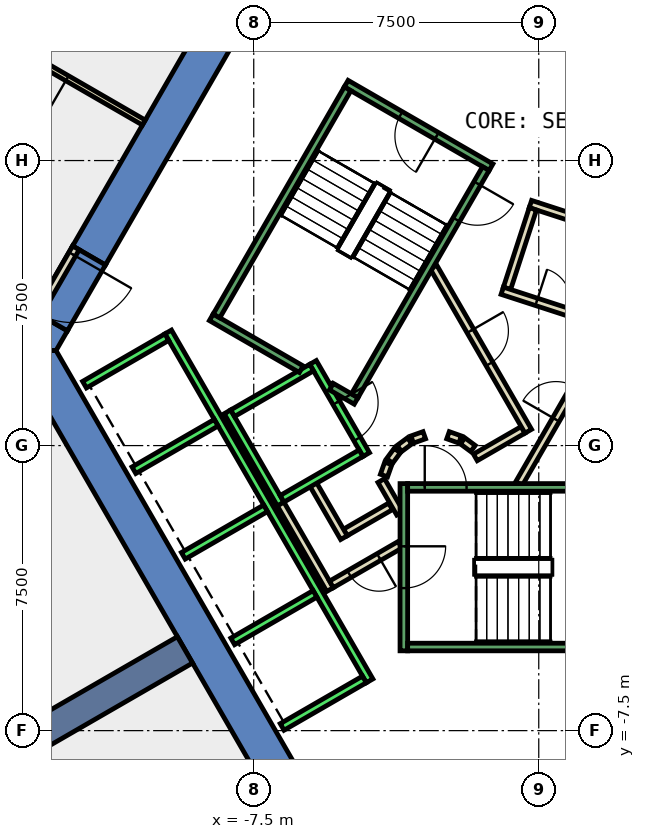
"""IFC4 building model, lengths in metres.
Left out: names, types, materials, properties, quantities, classifications, styles, units other than length and angle.
Written with IfcOpenShell. Run it as: python <this file> out.ifc"""

import sys

from ifc_helpers import new_model, si_unit, direction, frame, frame_2d, origin, place, context, subcontext, project, spatial, polyline, rectangle, outline, extrude, element, fill, save


model = new_model("IFC4")
c1 = context("Model", 3, precision=1e-05, world=origin(), true_north=direction((0.0, 1.0)))
c2 = subcontext(c1, "Body", "Model", "MODEL_VIEW")
j1 = project(units=[si_unit("LENGTHUNIT", "METRE"), si_unit("PLANEANGLEUNIT", "RADIAN")], contexts=[c1])
p1 = place(None, origin())
s1 = spatial("IfcSite", under=j1, at=p1, CompositionType="ELEMENT")
p2 = place(p1, origin())
s2 = spatial("IfcBuilding", under=s1, at=p2, CompositionType="ELEMENT")
p3 = place(p2, frame((0.0, 0.0, 15.0)))
s3 = spatial("IfcBuildingStorey", under=s2, at=p3, CompositionType="ELEMENT", Elevation=15.0)
p4 = place(p3, frame((0.0, 0.0, -0.45)))
e1 = element("IfcWall", 1, at=p4, inside=s3, PredefinedType="SHEAR", context=c2, shape_type="SweptSolid", body=[
    extrude(outline(polyline([(-12.267, 5.252), (-11.402, 4.752), (-6.351, 13.5), (-6.928, 14.5), (-12.267, 5.252)])), origin(), (0.0, 0.0, 1.0), 5.0),
])
p5 = place(p3, frame((0.0, 0.0, -0.45)))
e2 = element("IfcWall", 2, at=p5, inside=s3, PredefinedType="SHEAR", context=c2, shape_type="SweptSolid", body=[
    extrude(outline(polyline([(-12.402, 3.02), (-13.267, 3.52), (-13.856, 2.5), (-12.702, 2.5), (-12.402, 3.02)])), origin(), (0.0, 0.0, 1.0), 5.0),
])
p6 = place(p3, frame((0.0, 0.0, 3.6)))
e3 = element("IfcWall", 3, at=p6, inside=s3, PredefinedType="SHEAR", context=c2, shape_type="SweptSolid", body=[
    extrude(outline(polyline([(-13.267, 3.52), (-12.402, 3.02), (-11.402, 4.752), (-12.267, 5.252), (-13.267, 3.52)])), origin(), (0.0, 0.0, 1.0), 0.95),
])
p7 = place(p3, frame((0.0, 0.0, -0.45)))
e4 = element("IfcWall", 4, at=p7, inside=s3, PredefinedType="SHEAR", context=c2, shape_type="SweptSolid", body=[
    extrude(outline(polyline([(-13.856, 2.5), (-6.928, -9.5), (-6.351, -8.5), (-12.702, 2.5), (-13.856, 2.5)])), origin(), (0.0, 0.0, 1.0), 5.0),
])
p8 = place(p3, frame((-9.31, -5.375, -0.45), z_axis=(0.0, 0.0, 1.0), x_axis=(-0.866017533419, -0.500013631625, 0.0)))
e5 = element("IfcWall", 5, at=p8, inside=s3, PredefinedType="SHEAR", context=c2, shape_type="SweptSolid", body=[
    extrude(rectangle(XDim=9.0, YDim=0.8, at=frame_2d((4.5, 0.0))), origin(), (0.0, 0.0, 1.0), 5.0),
])
p9 = place(p3, frame((-3.9, -1.599, 0.0), z_axis=(0.0, 0.0, 1.0), x_axis=(-0.865969445389, -0.500096910261, 0.0)))
e6 = element("IfcWall", 6, at=p9, inside=s3, PredefinedType="PARTITIONING", context=c2, shape_type="SweptSolid", body=[
    extrude(rectangle(XDim=1.373, YDim=0.2, at=frame_2d((0.687, 0.0))), origin(), (0.0, 0.0, 1.0), 4.55),
])
p10 = place(p3, frame((-5.126, -2.422, 0.0), z_axis=(0.0, 0.0, 1.0), x_axis=(-0.500062241894, 0.865989465428, 0.0)))
e7 = element("IfcWall", 7, at=p10, inside=s3, PredefinedType="PARTITIONING", context=c2, shape_type="SweptSolid", body=[
    extrude(rectangle(XDim=1.7, YDim=0.2, at=frame_2d((0.85, 0.0))), origin(), (0.0, 0.0, 1.0), 4.55),
])
p11 = place(p3, frame((-5.492, -3.788, 0.0), z_axis=(0.0, 0.0, 1.0), x_axis=(-0.500008949224, 0.866020236886, 0.0)))
e8 = element("IfcWall", 8, at=p11, inside=s3, PredefinedType="PARTITIONING", context=c2, shape_type="SweptSolid", body=[
    extrude(rectangle(XDim=2.68, YDim=0.2, at=frame_2d((1.34, 0.0))), origin(), (0.0, 0.0, 1.0), 4.55),
])
p12 = place(p3, frame((-4.145, -0.92, 0.0), z_axis=(0.0, 0.0, 1.0), x_axis=(0.499743786207, -0.866173278362, 0.0)))
e9 = element("IfcWall", 9, at=p12, inside=s3, PredefinedType="PARTITIONING", context=c2, shape_type="SweptSolid", body=[
    extrude(rectangle(XDim=0.991, YDim=0.2, at=frame_2d((0.495, 0.0))), origin(), (0.0, 0.0, 1.0), 4.55),
])
p13 = place(p3, frame((-3.65, -2.61, 0.0), z_axis=(0.0, 0.0, 1.0), x_axis=(-0.866072462134, -0.499918483688, 0.0)))
e10 = element("IfcWall", 10, at=p13, inside=s3, PredefinedType="PARTITIONING", context=c2, shape_type="SweptSolid", body=[
    extrude(rectangle(XDim=2.084, YDim=0.2, at=frame_2d((1.042, 0.0))), origin(), (0.0, 0.0, 1.0), 4.55),
])
p14 = place(p13, frame((0.642, 0.0, 0.0)))
e11 = element("IfcOpeningElement", 11, at=p14, cuts=e10, PredefinedType="OPENING", context=c2, shape_type="SweptSolid", body=[
    extrude(rectangle(XDim=0.9, YDim=2.1, at=frame_2d((0.45, 1.05))), frame((0.0, 0.11, 0.0), z_axis=(0.0, -1.0, 0.0), x_axis=(1.0, 0.0, 0.0)), (0.0, 0.0, 1.0), 0.22),
])
p15 = place(p3, frame((2.285, 5.543, 0.0), z_axis=(0.0, 0.0, 1.0), x_axis=(-0.951121264368, 0.308817649215, 0.0)))
e12 = element("IfcWall", 12, at=p15, inside=s3, PredefinedType="PARTITIONING", context=c2, shape_type="SweptSolid", body=[
    extrude(rectangle(XDim=2.633, YDim=0.2, at=frame_2d((1.316, 0.0))), origin(), (0.0, 0.0, 1.0), 4.55),
])
p16 = place(p3, frame((-0.155, 6.23, 0.0), z_axis=(0.0, 0.0, 1.0), x_axis=(-0.309093600997, -0.951031621884, 0.0)))
e13 = element("IfcWall", 13, at=p16, inside=s3, PredefinedType="PARTITIONING", context=c2, shape_type="SweptSolid", body=[
    extrude(rectangle(XDim=2.2, YDim=0.2, at=frame_2d((1.1, 0.0))), origin(), (0.0, 0.0, 1.0), 4.55),
])
p17 = place(p3, frame((-0.961, 4.074, 0.0), z_axis=(0.0, 0.0, 1.0), x_axis=(0.951079555704, -0.308946077369, 0.0)))
e14 = element("IfcWall", 14, at=p17, inside=s3, PredefinedType="PARTITIONING", context=c2, shape_type="SweptSolid", body=[
    extrude(rectangle(XDim=2.8, YDim=0.2, at=frame_2d((1.4, 0.0))), origin(), (0.0, 0.0, 1.0), 4.55),
])
p18 = place(p17, frame((0.95, 0.0, 0.0)))
e15 = element("IfcOpeningElement", 15, at=p18, cuts=e14, PredefinedType="OPENING", context=c2, shape_type="SweptSolid", body=[
    extrude(rectangle(XDim=0.9, YDim=2.1, at=frame_2d((0.45, 1.05))), frame((0.0, 0.11, 0.0), z_axis=(0.0, -1.0, 0.0), x_axis=(1.0, 0.0, 0.0)), (0.0, 0.0, 1.0), 0.22),
])
p19 = place(p3, frame((-0.52, -1.0, 0.0), z_axis=(0.0, 0.0, 1.0), x_axis=(0.50011622646, 0.865958290007, 0.0)))
e16 = element("IfcWall", 16, at=p19, inside=s3, PredefinedType="PARTITIONING", context=c2, shape_type="SweptSolid", body=[
    extrude(rectangle(XDim=4.991, YDim=0.2, at=frame_2d((2.496, 0.0))), origin(), (0.0, 0.0, 1.0), 4.55),
])
p20 = place(p19, frame((1.945, 0.0, 0.0)))
e17 = element("IfcOpeningElement", 17, at=p20, cuts=e16, PredefinedType="OPENING", context=c2, shape_type="SweptSolid", body=[
    extrude(rectangle(XDim=1.0, YDim=2.1, at=frame_2d((0.5, 1.05))), frame((0.0, 0.11, 0.0), z_axis=(0.0, -1.0, 0.0), x_axis=(1.0, 0.0, 0.0)), (0.0, 0.0, 1.0), 0.22),
])
p21 = place(p3, frame((-0.412, 0.414, 0.0), z_axis=(0.0, 0.0, 1.0), x_axis=(-0.866017369001, -0.500013916395, 0.0)))
e18 = element("IfcWall", 18, at=p21, inside=s3, PredefinedType="PARTITIONING", context=c2, shape_type="SweptSolid", body=[
    extrude(rectangle(XDim=1.45, YDim=0.2, at=frame_2d((0.725, 0.0))), origin(), (0.0, 0.0, 1.0), 4.55),
])
p22 = place(p3, frame((-1.731, -0.077, 0.0), z_axis=(0.0, 0.0, 1.0), x_axis=(-0.804311165252, 0.594208338422, 0.0)))
e19 = element("IfcWall", 19, at=p22, inside=s3, PredefinedType="PARTITIONING", context=c2, shape_type="SweptSolid", body=[
    extrude(rectangle(XDim=0.338, YDim=0.2, at=frame_2d((0.169, 0.0))), origin(), (0.0, 0.0, 1.0), 4.55),
])
p23 = place(p3, frame((-2.07, 0.16, 0.0), z_axis=(0.0, 0.0, 1.0), x_axis=(-0.942199461132, 0.335052496547, 0.0)))
e20 = element("IfcWall", 20, at=p23, inside=s3, PredefinedType="PARTITIONING", context=c2, shape_type="SweptSolid", body=[
    extrude(rectangle(XDim=0.337, YDim=0.2, at=frame_2d((0.169, 0.0))), origin(), (0.0, 0.0, 1.0), 4.55),
])
p24 = place(p3, frame((-3.012, 0.273, 0.0), z_axis=(0.0, 0.0, 1.0), x_axis=(-0.942280615813, -0.334824194261, 0.0)))
e21 = element("IfcWall", 21, at=p24, inside=s3, PredefinedType="PARTITIONING", context=c2, shape_type="SweptSolid", body=[
    extrude(rectangle(XDim=0.338, YDim=0.2, at=frame_2d((0.169, 0.0))), origin(), (0.0, 0.0, 1.0), 4.55),
])
p25 = place(p3, frame((-3.397, 0.124, 0.0), z_axis=(0.0, 0.0, 1.0), x_axis=(-0.804311165252, -0.594208338422, 0.0)))
e22 = element("IfcWall", 22, at=p25, inside=s3, PredefinedType="PARTITIONING", context=c2, shape_type="SweptSolid", body=[
    extrude(rectangle(XDim=0.338, YDim=0.2, at=frame_2d((0.169, 0.0))), origin(), (0.0, 0.0, 1.0), 4.55),
])
p26 = place(p3, frame((-3.723, -0.131, 0.0), z_axis=(0.0, 0.0, 1.0), x_axis=(-0.594675113454, -0.803966112121, 0.0)))
e23 = element("IfcWall", 23, at=p26, inside=s3, PredefinedType="PARTITIONING", context=c2, shape_type="SweptSolid", body=[
    extrude(rectangle(XDim=0.338, YDim=0.2, at=frame_2d((0.169, 0.0))), origin(), (0.0, 0.0, 1.0), 4.55),
])
p27 = place(p3, frame((-3.96, -0.47, 0.0), z_axis=(0.0, 0.0, 1.0), x_axis=(-0.334824194261, -0.942280615813, 0.0)))
e24 = element("IfcWall", 24, at=p27, inside=s3, PredefinedType="PARTITIONING", context=c2, shape_type="SweptSolid", body=[
    extrude(rectangle(XDim=0.338, YDim=0.2, at=frame_2d((0.169, 0.0))), origin(), (0.0, 0.0, 1.0), 4.55),
])
p28 = place(p3, frame((-2.771, 4.7, 0.0), z_axis=(0.0, 0.0, 1.0), x_axis=(0.499969479948, -0.866043023828, 0.0)))
e25 = element("IfcWall", 25, at=p28, inside=s3, PredefinedType="PARTITIONING", context=c2, shape_type="SweptSolid", body=[
    extrude(rectangle(XDim=4.99, YDim=0.2, at=frame_2d((2.495, 0.0))), origin(), (0.0, 0.0, 1.0), 4.55),
])
p29 = place(p28, frame((1.945, 0.0, 0.0)))
e26 = element("IfcOpeningElement", 26, at=p29, cuts=e25, PredefinedType="OPENING", context=c2, shape_type="SweptSolid", body=[
    extrude(rectangle(XDim=1.0, YDim=2.1, at=frame_2d((0.5, 1.05))), frame((0.0, 0.11, 0.0), z_axis=(0.0, -1.0, 0.0), x_axis=(1.0, 0.0, 0.0)), (0.0, 0.0, 1.0), 0.22),
])
p30 = place(p3, frame((-10.392, 8.5, 0.0), z_axis=(0.0, 0.0, 1.0), x_axis=(-0.865967369837, 0.500100504277, 0.0)))
e27 = element("IfcWall", 27, at=p30, inside=s3, PredefinedType="PARTITIONING", context=c2, shape_type="SweptSolid", body=[
    extrude(rectangle(XDim=6.317, YDim=0.15, at=frame_2d((3.158, 0.0))), origin(), (0.0, 0.0, 1.0), 4.55),
])
p31 = place(p30, frame((2.33, 0.0, 0.0)))
e28 = element("IfcOpeningElement", 28, at=p31, cuts=e27, PredefinedType="OPENING", context=c2, shape_type="SweptSolid", body=[
    extrude(rectangle(XDim=1.8, YDim=2.1, at=frame_2d((0.9, 1.05))), frame((0.0, 0.085, 0.0), z_axis=(0.0, -1.0, 0.0), x_axis=(1.0, 0.0, 0.0)), (0.0, 0.0, 1.0), 0.17),
])
p32 = place(p3, frame((-12.18, 5.202, 0.0), z_axis=(0.0, 0.0, 1.0), x_axis=(-0.50002537861, -0.866010750942, 0.0)))
e29 = element("IfcWall", 29, at=p32, inside=s3, PredefinedType="PARTITIONING", context=c2, shape_type="SweptSolid", body=[
    extrude(rectangle(XDim=2.0, YDim=0.2, at=frame_2d((1.0, 0.0))), origin(), (0.0, 0.0, 1.0), 2.4),
])
p33 = place(p32, frame((0.19, 0.0, 0.0)))
e30 = element("IfcOpeningElement", 30, at=p33, cuts=e29, PredefinedType="OPENING", context=c2, shape_type="SweptSolid", body=[
    extrude(rectangle(XDim=1.8, YDim=2.1, at=frame_2d((0.9, 1.05))), frame((0.0, 0.11, 0.0), z_axis=(0.0, -1.0, 0.0), x_axis=(1.0, 0.0, 0.0)), (0.0, 0.0, 1.0), 0.22),
])
p34 = place(p3, frame((-5.94, 2.188, 0.0), z_axis=(0.0, 0.0, 1.0), x_axis=(0.49994636267, -0.866056369097, 0.0)))
e31 = element("IfcWall", 31, at=p34, inside=s3, PredefinedType="STANDARD", context=c2, shape_type="SweptSolid", body=[
    extrude(rectangle(XDim=2.8, YDim=0.2, at=frame_2d((1.4, 0.0))), origin(), (0.0, 0.0, 1.0), 4.55),
])
p35 = place(p34, frame((1.225, 0.0, 0.0)))
e32 = element("IfcOpeningElement", 32, at=p35, cuts=e31, PredefinedType="OPENING", context=c2, shape_type="SweptSolid", body=[
    extrude(rectangle(XDim=1.1, YDim=2.1, at=frame_2d((0.55, 1.05))), frame((0.0, 0.11, 0.0), z_axis=(0.0, -1.0, 0.0), x_axis=(1.0, 0.0, 0.0)), (0.0, 0.0, 1.0), 0.22),
])
p36 = place(p3, frame((-8.192, 0.888, 0.0), z_axis=(0.0, 0.0, 1.0), x_axis=(0.49994636267, -0.866056369097, 0.0)))
e33 = element("IfcWall", 33, at=p36, inside=s3, PredefinedType="STANDARD", context=c2, shape_type="SweptSolid", body=[
    extrude(rectangle(XDim=2.8, YDim=0.2, at=frame_2d((1.4, 0.0))), origin(), (0.0, 0.0, 1.0), 4.55),
])
for number, where, z_axis, x_axis in (
    (34, (-5.977, 2.052, 0.0), (0.0, 0.0, 1.0), (-0.866, -0.5, 0.0)),
    (35, (-4.677, -0.2, 0.0), (0.0, 0.0, 1.0), (-0.866, -0.5, 0.0)),
):
    element("IfcWall", number, at=place(p3, frame(where, z_axis=z_axis, x_axis=x_axis)), inside=s3, PredefinedType="STANDARD", context=c2, shape_type="SweptSolid", body=[
        extrude(rectangle(XDim=2.399, YDim=0.2, at=frame_2d((1.2, 0.0))), origin(), (0.0, 0.0, 1.0), 4.55),
    ])
p37 = place(p3, frame((-9.751, 2.99, 0.0), z_axis=(0.0, 0.0, 1.0), x_axis=(0.50000090737, -0.866024879913, 0.0)))
e36 = element("IfcWall", 36, at=p37, inside=s3, PredefinedType="STANDARD", context=c2, shape_type="SweptSolid", body=[
    extrude(rectangle(XDim=10.6, YDim=0.2, at=frame_2d((5.3, 0.0))), origin(), (0.0, 0.0, 1.0), 4.55),
])
p38 = place(p3, frame((-9.788, 2.853, 0.0), z_axis=(0.0, 0.0, 1.0), x_axis=(-0.865998541277, -0.500046524342, 0.0)))
e37 = element("IfcWall", 37, at=p38, inside=s3, PredefinedType="STANDARD", context=c2, shape_type="SweptSolid", body=[
    extrude(rectangle(XDim=2.5, YDim=0.2, at=frame_2d((1.25, 0.0))), origin(), (0.0, 0.0, 1.0), 4.55),
])
for number, where, z_axis, x_axis in (
    (38, (-8.488, 0.602, 0.0), (0.0, 0.0, 1.0), (-0.866, -0.5, 0.0)),
    (39, (-7.188, -1.65, 0.0), (0.0, 0.0, 1.0), (-0.866, -0.5, 0.0)),
    (40, (-5.888, -3.902, 0.0), (0.0, 0.0, 1.0), (-0.866, -0.5, 0.0)),
    (41, (-4.588, -6.153, 0.0), (0.0, 0.0, 1.0), (-0.866, -0.5, 0.0)),
):
    element("IfcWall", number, at=place(p3, frame(where, z_axis=z_axis, x_axis=x_axis)), inside=s3, PredefinedType="STANDARD", context=c2, shape_type="SweptSolid", body=[
        extrude(rectangle(XDim=2.5, YDim=0.2, at=frame_2d((1.25, 0.0))), origin(), (0.0, 0.0, 1.0), 4.55),
    ])
p39 = place(p3, frame((-3.55, -1.0, 0.0), z_axis=(0.0, 0.0, 1.0), x_axis=(0.0, -1.0, 0.0)))
e42 = element("IfcWall", 42, at=p39, inside=s3, PredefinedType="STANDARD", context=c2, shape_type="SweptSolid", body=[
    extrude(rectangle(XDim=4.4, YDim=0.2, at=frame_2d((2.2, 0.0))), origin(), (0.0, 0.0, 1.0), 4.55),
])
p40 = place(p39, frame((1.65, 0.0, 0.0)))
e43 = element("IfcOpeningElement", 43, at=p40, cuts=e42, PredefinedType="OPENING", context=c2, shape_type="SweptSolid", body=[
    extrude(rectangle(XDim=1.1, YDim=2.2, at=frame_2d((0.55, 1.1))), frame((0.0, 0.11, 0.0), z_axis=(0.0, -1.0, 0.0), x_axis=(1.0, 0.0, 0.0)), (0.0, 0.0, 1.0), 0.22),
])
p41 = place(p3, frame((-3.45, -1.1, 0.0), z_axis=(0.0, 0.0, 1.0), x_axis=(1.0, 0.0, 0.0)))
e44 = element("IfcWall", 44, at=p41, inside=s3, PredefinedType="STANDARD", context=c2, shape_type="SweptSolid", body=[
    extrude(rectangle(XDim=6.9, YDim=0.2, at=frame_2d((3.45, 0.0))), origin(), (0.0, 0.0, 1.0), 4.55),
])
p42 = place(p41, frame((0.45, 0.0, 0.0)))
e45 = element("IfcOpeningElement", 45, at=p42, cuts=e44, PredefinedType="OPENING", context=c2, shape_type="SweptSolid", body=[
    extrude(rectangle(XDim=1.1, YDim=2.2, at=frame_2d((0.55, 1.1))), frame((0.0, 0.11, 0.0), z_axis=(0.0, -1.0, 0.0), x_axis=(1.0, 0.0, 0.0)), (0.0, 0.0, 1.0), 0.22),
])
p43 = place(p3, frame((-3.45, -5.3, 0.0), z_axis=(0.0, 0.0, 1.0), x_axis=(1.0, 0.0, 0.0)))
e46 = element("IfcWall", 46, at=p43, inside=s3, PredefinedType="STANDARD", context=c2, shape_type="SweptSolid", body=[
    extrude(rectangle(XDim=6.9, YDim=0.2, at=frame_2d((3.45, 0.0))), origin(), (0.0, 0.0, 1.0), 4.55),
])
p44 = place(p3, frame((-1.256, 7.324, 0.0), z_axis=(0.0, 0.0, 1.0), x_axis=(-0.866046073146, 0.499964197906, 0.0)))
e47 = element("IfcWall", 47, at=p44, inside=s3, PredefinedType="STANDARD", context=c2, shape_type="SweptSolid", body=[
    extrude(rectangle(XDim=4.4, YDim=0.2, at=frame_2d((2.2, 0.0))), origin(), (0.0, 0.0, 1.0), 4.55),
])
p45 = place(p44, frame((1.65, 0.0, 0.0)))
e48 = element("IfcOpeningElement", 48, at=p45, cuts=e47, PredefinedType="OPENING", context=c2, shape_type="SweptSolid", body=[
    extrude(rectangle(XDim=1.1, YDim=2.2, at=frame_2d((0.55, 1.1))), frame((0.0, 0.11, 0.0), z_axis=(0.0, -1.0, 0.0), x_axis=(1.0, 0.0, 0.0)), (0.0, 0.0, 1.0), 0.22),
])
p46 = place(p3, frame((-6.25, 2.01, 0.0), z_axis=(0.0, 0.0, 1.0), x_axis=(-0.86611865017, 0.499838457731, 0.0)))
e49 = element("IfcWall", 49, at=p46, inside=s3, PredefinedType="STANDARD", context=c2, shape_type="SweptSolid", body=[
    extrude(rectangle(XDim=2.733, YDim=0.2, at=frame_2d((1.366, 0.0))), origin(), (0.0, 0.0, 1.0), 4.55),
])
p47 = place(p3, frame((-4.806, 1.176, 0.0), z_axis=(0.0, 0.0, 1.0), x_axis=(-0.866558586415, 0.499075361355, 0.0)))
e50 = element("IfcWall", 50, at=p47, inside=s3, PredefinedType="STANDARD", context=c2, shape_type="SweptSolid", body=[
    extrude(rectangle(XDim=0.751, YDim=0.2, at=frame_2d((0.376, 0.0))), origin(), (0.0, 0.0, 1.0), 4.55),
])
p48 = place(p3, frame((-1.393, 7.288, 0.0), z_axis=(0.0, 0.0, 1.0), x_axis=(-0.499963383562, -0.866046543262, 0.0)))
e51 = element("IfcWall", 51, at=p48, inside=s3, PredefinedType="STANDARD", context=c2, shape_type="SweptSolid", body=[
    extrude(rectangle(XDim=6.9, YDim=0.2, at=frame_2d((3.45, 0.0))), origin(), (0.0, 0.0, 1.0), 4.55),
])
p49 = place(p48, frame((0.45, 0.0, 0.0)))
e52 = element("IfcOpeningElement", 52, at=p49, cuts=e51, PredefinedType="OPENING", context=c2, shape_type="SweptSolid", body=[
    extrude(rectangle(XDim=1.1, YDim=2.2, at=frame_2d((0.55, 1.1))), frame((0.0, 0.11, 0.0), z_axis=(0.0, -1.0, 0.0), x_axis=(1.0, 0.0, 0.0)), (0.0, 0.0, 1.0), 0.22),
])
p50 = place(p3, frame((-5.03, 9.388, 0.0), z_axis=(0.0, 0.0, 1.0), x_axis=(-0.499978703459, -0.866037698999, 0.0)))
e53 = element("IfcWall", 53, at=p50, inside=s3, PredefinedType="STANDARD", context=c2, shape_type="SweptSolid", body=[
    extrude(rectangle(XDim=6.9, YDim=0.2, at=frame_2d((3.45, 0.0))), origin(), (0.0, 0.0, 1.0), 4.55),
])
p51 = place(p31, origin())
e54 = element("IfcDoor", 54, at=p51, inside=s3, OperationType="DOUBLE_DOOR_SINGLE_SWING", PredefinedType="DOOR", context=c2, shape_type="SweptSolid", body=[
    extrude(rectangle(XDim=1.8, YDim=2.1, at=frame_2d((0.9, 1.05))), frame((0.0, 0.025, 0.0), z_axis=(0.0, -1.0, 0.0), x_axis=(1.0, 0.0, 0.0)), (0.0, 0.0, 1.0), 0.05),
])
fill(e28, e54)
p52 = place(p20, origin())
e55 = element("IfcDoor", 55, at=p52, inside=s3, OperationType="SINGLE_SWING_LEFT", PredefinedType="DOOR", context=c2, shape_type="SweptSolid", body=[
    extrude(rectangle(XDim=1.0, YDim=2.1, at=frame_2d((0.5, 1.05))), frame((0.0, 0.025, 0.0), z_axis=(0.0, -1.0, 0.0), x_axis=(1.0, 0.0, 0.0)), (0.0, 0.0, 1.0), 0.05),
])
fill(e17, e55)
p53 = place(p29, origin())
e56 = element("IfcDoor", 56, at=p53, inside=s3, OperationType="SINGLE_SWING_RIGHT", PredefinedType="DOOR", context=c2, shape_type="SweptSolid", body=[
    extrude(rectangle(XDim=1.0, YDim=2.1, at=frame_2d((0.5, 1.05))), frame((0.0, 0.025, 0.0), z_axis=(0.0, -1.0, 0.0), x_axis=(1.0, 0.0, 0.0)), (0.0, 0.0, 1.0), 0.05),
])
fill(e26, e56)
p54 = place(p14, origin())
e57 = element("IfcDoor", 57, at=p54, inside=s3, OperationType="SINGLE_SWING_LEFT", PredefinedType="DOOR", context=c2, shape_type="SweptSolid", body=[
    extrude(rectangle(XDim=0.9, YDim=2.1, at=frame_2d((0.45, 1.05))), frame((0.0, 0.025, 0.0), z_axis=(0.0, -1.0, 0.0), x_axis=(1.0, 0.0, 0.0)), (0.0, 0.0, 1.0), 0.05),
])
fill(e11, e57)
p55 = place(p18, origin())
e58 = element("IfcDoor", 58, at=p55, inside=s3, OperationType="SINGLE_SWING_LEFT", PredefinedType="DOOR", context=c2, shape_type="SweptSolid", body=[
    extrude(rectangle(XDim=0.9, YDim=2.1, at=frame_2d((0.45, 1.05))), frame((0.0, 0.025, 0.0), z_axis=(0.0, -1.0, 0.0), x_axis=(1.0, 0.0, 0.0)), (0.0, 0.0, 1.0), 0.05),
])
fill(e15, e58)
p56 = place(p33, origin())
e59 = element("IfcDoor", 59, at=p56, inside=s3, OperationType="DOUBLE_DOOR_SINGLE_SWING", PredefinedType="DOOR", context=c2, shape_type="SweptSolid", body=[
    extrude(rectangle(XDim=1.8, YDim=2.1, at=frame_2d((0.9, 1.05))), frame((0.0, 0.025, 0.0), z_axis=(0.0, -1.0, 0.0), x_axis=(1.0, 0.0, 0.0)), (0.0, 0.0, 1.0), 0.05),
])
fill(e30, e59)
p57 = place(p35, origin())
e60 = element("IfcDoor", 60, at=p57, inside=s3, OperationType="SLIDING_TO_LEFT", PredefinedType="DOOR", context=c2, shape_type="SweptSolid", body=[
    extrude(rectangle(XDim=1.1, YDim=2.1, at=frame_2d((0.55, 1.05))), frame((0.0, 0.025, 0.0), z_axis=(0.0, -1.0, 0.0), x_axis=(1.0, 0.0, 0.0)), (0.0, 0.0, 1.0), 0.05),
])
fill(e32, e60)
p58 = place(p42, origin())
e61 = element("IfcDoor", 61, at=p58, inside=s3, OperationType="SINGLE_SWING_LEFT", PredefinedType="DOOR", context=c2, shape_type="SweptSolid", body=[
    extrude(rectangle(XDim=1.1, YDim=2.2, at=frame_2d((0.55, 1.1))), frame((0.0, 0.025, 0.0), z_axis=(0.0, -1.0, 0.0), x_axis=(1.0, 0.0, 0.0)), (0.0, 0.0, 1.0), 0.05),
])
fill(e45, e61)
p59 = place(p40, origin())
e62 = element("IfcDoor", 62, at=p59, inside=s3, OperationType="SINGLE_SWING_LEFT", PredefinedType="DOOR", context=c2, shape_type="SweptSolid", body=[
    extrude(rectangle(XDim=1.1, YDim=2.2, at=frame_2d((0.55, 1.1))), frame((0.0, 0.025, 0.0), z_axis=(0.0, -1.0, 0.0), x_axis=(1.0, 0.0, 0.0)), (0.0, 0.0, 1.0), 0.05),
])
fill(e43, e62)
p60 = place(p49, origin())
e63 = element("IfcDoor", 63, at=p60, inside=s3, OperationType="SINGLE_SWING_LEFT", PredefinedType="DOOR", context=c2, shape_type="SweptSolid", body=[
    extrude(rectangle(XDim=1.1, YDim=2.2, at=frame_2d((0.55, 1.1))), frame((0.0, 0.025, 0.0), z_axis=(0.0, -1.0, 0.0), x_axis=(1.0, 0.0, 0.0)), (0.0, 0.0, 1.0), 0.05),
])
fill(e52, e63)
p61 = place(p45, origin())
e64 = element("IfcDoor", 64, at=p61, inside=s3, OperationType="SINGLE_SWING_LEFT", PredefinedType="DOOR", context=c2, shape_type="SweptSolid", body=[
    extrude(rectangle(XDim=1.1, YDim=2.2, at=frame_2d((0.55, 1.1))), frame((0.0, 0.025, 0.0), z_axis=(0.0, -1.0, 0.0), x_axis=(1.0, 0.0, 0.0)), (0.0, 0.0, 1.0), 0.05),
])
fill(e48, e64)
save(model, sys.argv[1])
